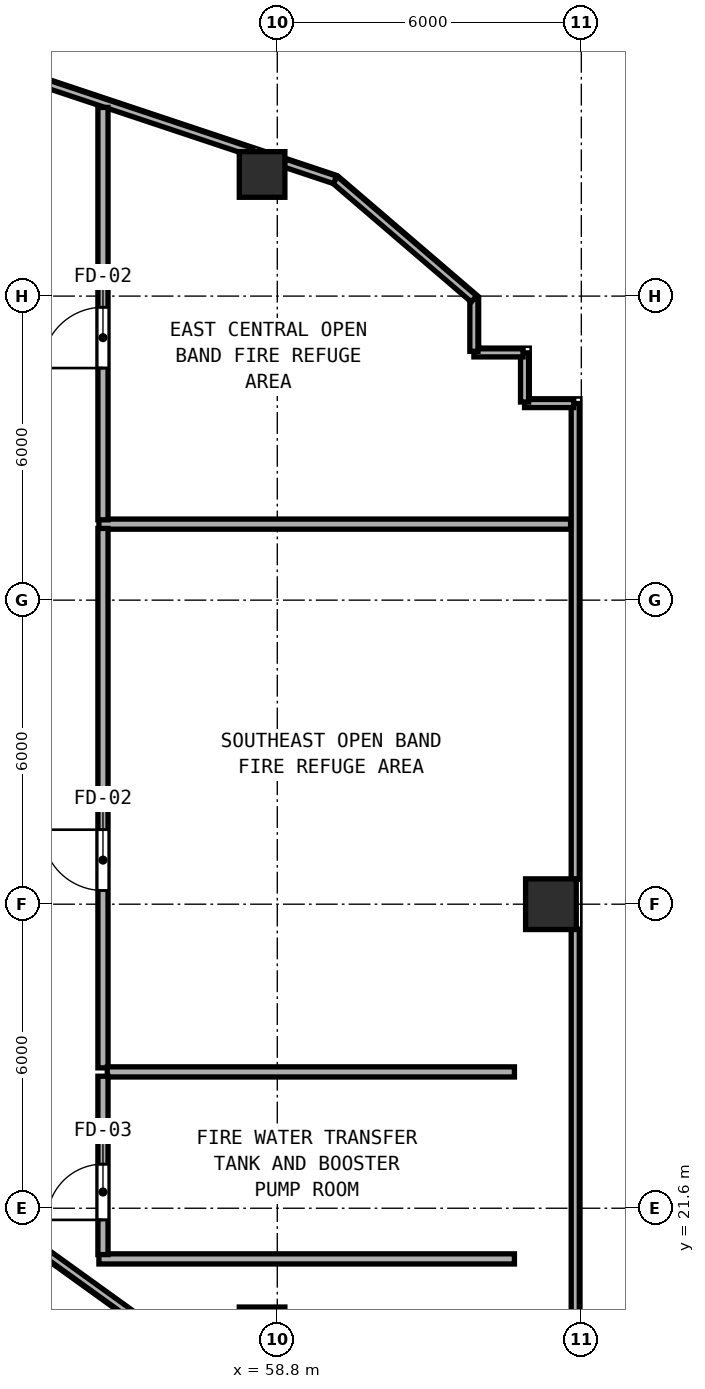
"""IFC4 building model, lengths in metres.
Left out: names, types, materials, properties, quantities, classifications, styles, units other than length and angle.
Written with IfcOpenShell. Run it as: python <this file> out.ifc"""

import sys

from ifc_helpers import new_model, si_unit, direction, frame, frame_2d, origin, origin_2d, place, context, subcontext, project, spatial, rectangle, hollow_rectangle, extrude, element, fill, save


model = new_model("IFC4")
c1 = context("Model", 3, precision=1e-05, world=origin(), true_north=direction((0.0, 1.0)))
c2 = subcontext(c1, "Body", "Model", "MODEL_VIEW")
j1 = project(units=[si_unit("LENGTHUNIT", "METRE"), si_unit("PLANEANGLEUNIT", "RADIAN")], contexts=[c1])
p1 = place(None, origin())
s1 = spatial("IfcSite", under=j1, at=p1, CompositionType="ELEMENT")
p2 = place(p1, origin())
s2 = spatial("IfcBuilding", under=s1, at=p2, CompositionType="ELEMENT")
p3 = place(p2, frame((0.0, 0.0, 160.0)))
s3 = spatial("IfcBuildingStorey", under=s2, at=p3, CompositionType="ELEMENT", Elevation=160.0)
p4 = place(p3, frame((64.2, 27.6, 0.0), z_axis=(0.0, 0.0, 1.0), x_axis=(1.0, 0.0, 0.0)))
e1 = element("IfcColumn", 1, at=p4, inside=s3, PredefinedType="COLUMN", context=c2, shape_type="SweptSolid", body=[
    extrude(hollow_rectangle(XDim=1.0, YDim=1.0, WallThickness=0.038, at=origin_2d()), origin(), (0.0, 0.0, 1.0), 4.6),
])
for number, where, z_axis, x_axis in (
    (2, (58.5, 19.2, 0.0), (0.0, 0.0, 1.0), (1.0, 0.0, 0.0)),
    (3, (58.5, 42.0, 0.0), (0.0, 0.0, 1.0), (1.0, 0.0, 0.0)),
):
    element("IfcColumn", number, at=place(p3, frame(where, z_axis=z_axis, x_axis=x_axis)), inside=s3, PredefinedType="COLUMN", context=c2, shape_type="SweptSolid", body=[
        extrude(hollow_rectangle(XDim=0.9, YDim=0.9, WallThickness=0.034, at=origin_2d()), origin(), (0.0, 0.0, 1.0), 4.6),
    ])
p5 = place(p3, frame((53.292, 21.394, 0.0), z_axis=(0.0, 0.0, 1.0), x_axis=(0.811535942642, -0.584302501963, 0.0)))
e4 = element("IfcWall", 4, at=p5, inside=s3, PredefinedType="PARAPET", context=c2, shape_type="SweptSolid", body=[
    extrude(rectangle(XDim=11.568, YDim=0.16, at=frame_2d((5.784, 0.0))), origin(), (0.0, 0.0, 1.0), 1.15),
])
p6 = place(p3, frame((64.68, 17.292, 0.0), z_axis=(0.0, 0.0, 1.0), x_axis=(0.0, 1.0, 0.0)))
e5 = element("IfcWall", 5, at=p6, inside=s3, PredefinedType="PARAPET", context=c2, shape_type="SweptSolid", body=[
    extrude(rectangle(XDim=9.816, YDim=0.16, at=frame_2d((4.908, 0.0))), origin(), (0.0, 0.0, 1.0), 1.15),
])
p7 = place(p3, frame((64.68, 28.092, 0.0), z_axis=(0.0, 0.0, 1.0), x_axis=(0.0, 1.0, 0.0)))
e6 = element("IfcWall", 6, at=p7, inside=s3, PredefinedType="PARAPET", context=c2, shape_type="SweptSolid", body=[
    extrude(rectangle(XDim=9.388, YDim=0.16, at=frame_2d((4.694, 0.0))), origin(), (0.0, 0.0, 1.0), 1.15),
])
for number, where, z_axis, x_axis in (
    (7, (64.65, 37.48, 0.0), (0.0, 0.0, 1.0), (-1.0, 0.0, 0.0)),
    (8, (63.68, 37.51, 0.0), (0.0, 0.0, 1.0), (0.0, 1.0, 0.0)),
    (9, (63.65, 38.48, 0.0), (0.0, 0.0, 1.0), (-1.0, 0.0, 0.0)),
):
    element("IfcWall", number, at=place(p3, frame(where, z_axis=z_axis, x_axis=x_axis)), inside=s3, PredefinedType="PARAPET", context=c2, shape_type="SweptSolid", body=[
        extrude(rectangle(XDim=0.97, YDim=0.16, at=frame_2d((0.485, 0.0))), origin(), (0.0, 0.0, 1.0), 1.15),
    ])
p8 = place(p3, frame((62.68, 38.51, 0.0), z_axis=(0.0, 0.0, 1.0), x_axis=(0.0, 1.0, 0.0)))
e10 = element("IfcWall", 10, at=p8, inside=s3, PredefinedType="PARAPET", context=c2, shape_type="SweptSolid", body=[
    extrude(rectangle(XDim=1.035, YDim=0.16, at=frame_2d((0.518, 0.0))), origin(), (0.0, 0.0, 1.0), 1.15),
])
p9 = place(p3, frame((62.68, 39.545, 0.0), z_axis=(0.0, 0.0, 1.0), x_axis=(-0.759275702513, 0.650769089289, 0.0)))
e11 = element("IfcWall", 11, at=p9, inside=s3, PredefinedType="PARAPET", context=c2, shape_type="SweptSolid", body=[
    extrude(rectangle(XDim=3.609, YDim=0.16, at=frame_2d((1.805, 0.0))), origin(), (0.0, 0.0, 1.0), 1.15),
])
p10 = place(p3, frame((59.94, 41.894, 0.0), z_axis=(0.0, 0.0, 1.0), x_axis=(-0.948636865667, 0.316367029093, 0.0)))
e12 = element("IfcWall", 12, at=p10, inside=s3, PredefinedType="PARAPET", context=c2, shape_type="SweptSolid", body=[
    extrude(rectangle(XDim=1.052, YDim=0.16, at=frame_2d((0.526, 0.0))), origin(), (0.0, 0.0, 1.0), 1.15),
])
p11 = place(p3, frame((58.295, 42.442, 0.0), z_axis=(0.0, 0.0, 1.0), x_axis=(-0.948683298051, 0.316227766017, 0.0)))
e13 = element("IfcWall", 13, at=p11, inside=s3, PredefinedType="PARAPET", context=c2, shape_type="SweptSolid", body=[
    extrude(rectangle(XDim=5.918, YDim=0.16, at=frame_2d((2.959, 0.0))), origin(), (0.0, 0.0, 1.0), 1.15),
])
p12 = place(p3, frame((55.28, 35.1, 0.0), z_axis=(0.0, 0.0, 1.0), x_axis=(1.0, 0.0, 0.0)))
e14 = element("IfcWall", 14, at=p12, inside=s3, PredefinedType="SOLIDWALL", context=c2, shape_type="SweptSolid", body=[
    extrude(rectangle(XDim=9.308, YDim=0.2, at=frame_2d((4.654, 0.0))), origin(), (0.0, 0.0, 1.0), 4.35),
])
p13 = place(p3, frame((55.36, 24.37, 0.0), z_axis=(0.0, 0.0, 1.0), x_axis=(0.0, 1.0, 0.0)))
e15 = element("IfcWall", 15, at=p13, inside=s3, PredefinedType="SOLIDWALL", context=c2, shape_type="SweptSolid", body=[
    extrude(rectangle(XDim=10.645, YDim=0.2, at=frame_2d((5.322, 0.0))), origin(), (0.0, 0.0, 1.0), 4.35),
])
p14 = place(p13, frame((3.5, 0.0, 0.0)))
e16 = element("IfcOpeningElement", 16, at=p14, cuts=e15, PredefinedType="OPENING", context=c2, shape_type="SweptSolid", body=[
    extrude(rectangle(XDim=1.2, YDim=2.15, at=frame_2d((0.6, 1.075))), frame((0.0, 0.11, 0.0), z_axis=(0.0, -1.0, 0.0), x_axis=(1.0, 0.0, 0.0)), (0.0, 0.0, 1.0), 0.22),
])
p15 = place(p3, frame((55.36, 35.185, 0.0), z_axis=(0.0, 0.0, 1.0), x_axis=(0.0, 1.0, 0.0)))
e17 = element("IfcWall", 17, at=p15, inside=s3, PredefinedType="SOLIDWALL", context=c2, shape_type="SweptSolid", body=[
    extrude(rectangle(XDim=8.138, YDim=0.2, at=frame_2d((4.069, 0.0))), origin(), (0.0, 0.0, 1.0), 4.35),
])
p16 = place(p15, frame((2.995, 0.0, 0.0)))
e18 = element("IfcOpeningElement", 18, at=p16, cuts=e17, PredefinedType="OPENING", context=c2, shape_type="SweptSolid", body=[
    extrude(rectangle(XDim=1.2, YDim=2.15, at=frame_2d((0.6, 1.075))), frame((0.0, 0.11, 0.0), z_axis=(0.0, -1.0, 0.0), x_axis=(1.0, 0.0, 0.0)), (0.0, 0.0, 1.0), 0.22),
])
p17 = place(p3, frame((55.445, 24.29, 0.0), z_axis=(0.0, 0.0, 1.0), x_axis=(1.0, 0.0, 0.0)))
e19 = element("IfcWall", 19, at=p17, inside=s3, PredefinedType="SOLIDWALL", context=c2, shape_type="SweptSolid", body=[
    extrude(rectangle(XDim=8.035, YDim=0.2, at=frame_2d((4.018, 0.0))), origin(), (0.0, 0.0, 1.0), 4.35),
])
p18 = place(p3, frame((55.28, 20.6, 0.0), z_axis=(0.0, 0.0, 1.0), x_axis=(1.0, 0.0, 0.0)))
e20 = element("IfcWall", 20, at=p18, inside=s3, PredefinedType="SOLIDWALL", context=c2, shape_type="SweptSolid", body=[
    extrude(rectangle(XDim=8.2, YDim=0.2, at=frame_2d((4.1, 0.0))), origin(), (0.0, 0.0, 1.0), 4.35),
])
p19 = place(p3, frame((55.36, 20.685, 0.0), z_axis=(0.0, 0.0, 1.0), x_axis=(0.0, 1.0, 0.0)))
e21 = element("IfcWall", 21, at=p19, inside=s3, PredefinedType="SOLIDWALL", context=c2, shape_type="SweptSolid", body=[
    extrude(rectangle(XDim=3.52, YDim=0.2, at=frame_2d((1.76, 0.0))), origin(), (0.0, 0.0, 1.0), 4.35),
])
p20 = place(p19, frame((0.685, 0.0, 0.0)))
e22 = element("IfcOpeningElement", 22, at=p20, cuts=e21, PredefinedType="OPENING", context=c2, shape_type="SweptSolid", body=[
    extrude(rectangle(XDim=1.1, YDim=2.15, at=frame_2d((0.55, 1.075))), frame((0.0, 0.11, 0.0), z_axis=(0.0, -1.0, 0.0), x_axis=(1.0, 0.0, 0.0)), (0.0, 0.0, 1.0), 0.22),
])
p21 = place(p14, origin())
e23 = element("IfcDoor", 23, at=p21, inside=s3, OperationType="SINGLE_SWING_RIGHT", PredefinedType="DOOR", context=c2, shape_type="SweptSolid", body=[
    extrude(rectangle(XDim=1.2, YDim=2.15, at=frame_2d((0.6, 1.075))), frame((0.0, 0.025, 0.0), z_axis=(0.0, -1.0, 0.0), x_axis=(1.0, 0.0, 0.0)), (0.0, 0.0, 1.0), 0.05),
])
fill(e16, e23)
p22 = place(p16, origin())
e24 = element("IfcDoor", 24, at=p22, inside=s3, OperationType="SINGLE_SWING_LEFT", PredefinedType="DOOR", context=c2, shape_type="SweptSolid", body=[
    extrude(rectangle(XDim=1.2, YDim=2.15, at=frame_2d((0.6, 1.075))), frame((0.0, 0.025, 0.0), z_axis=(0.0, -1.0, 0.0), x_axis=(1.0, 0.0, 0.0)), (0.0, 0.0, 1.0), 0.05),
])
fill(e18, e24)
p23 = place(p20, origin())
e25 = element("IfcDoor", 25, at=p23, inside=s3, OperationType="SINGLE_SWING_LEFT", PredefinedType="DOOR", context=c2, shape_type="SweptSolid", body=[
    extrude(rectangle(XDim=1.1, YDim=2.15, at=frame_2d((0.55, 1.075))), frame((0.0, 0.025, 0.0), z_axis=(0.0, -1.0, 0.0), x_axis=(1.0, 0.0, 0.0)), (0.0, 0.0, 1.0), 0.05),
])
fill(e22, e25)
save(model, sys.argv[1])
